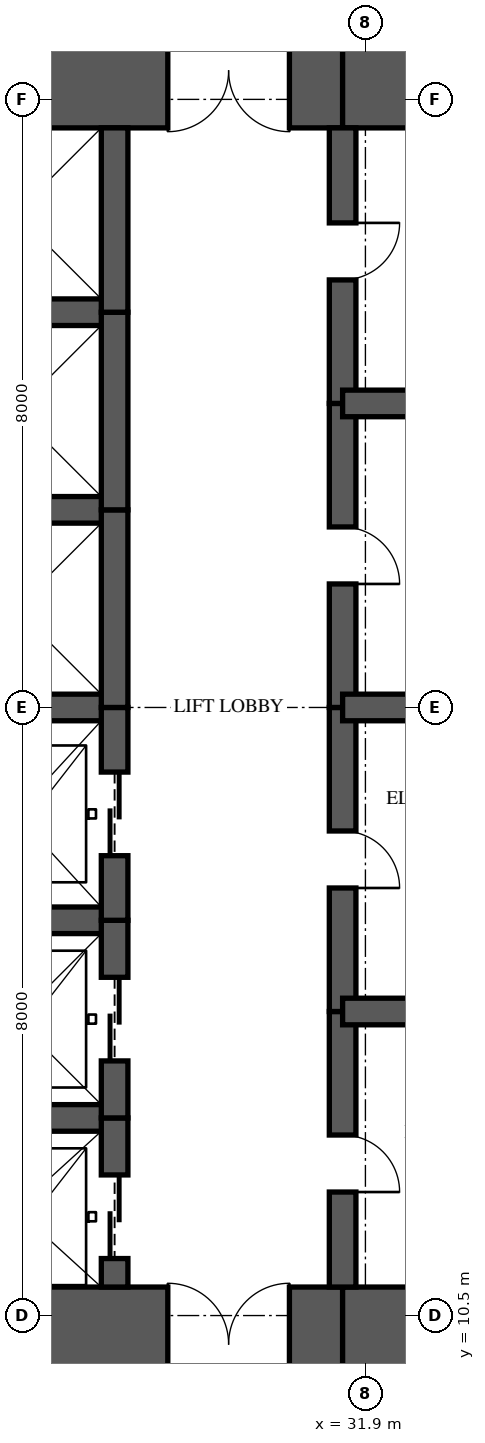
"""IFC4 building model, lengths in metres.
Left out: names, types, materials, properties, quantities, classifications, styles, units other than length and angle.
Written with IfcOpenShell. Run it as: python <this file> out.ifc"""

import sys

from ifc_helpers import new_model, si_unit, direction, frame, frame_2d, origin, place, context, subcontext, project, spatial, rectangle, extrude, element, fill, save


model = new_model("IFC4")
c1 = context("Model", 3, precision=1e-05, world=origin(), true_north=direction((0.0, 1.0)))
c2 = subcontext(c1, "Body", "Model", "MODEL_VIEW")
j1 = project(units=[si_unit("LENGTHUNIT", "METRE"), si_unit("PLANEANGLEUNIT", "RADIAN")], contexts=[c1])
p1 = place(None, origin())
s1 = spatial("IfcSite", under=j1, at=p1, CompositionType="ELEMENT")
p2 = place(p1, origin())
s2 = spatial("IfcBuilding", under=s1, at=p2, CompositionType="ELEMENT")
p3 = place(p2, frame((0.0, 0.0, 91.45)))
s3 = spatial("IfcBuildingStorey", under=s2, at=p3, CompositionType="ELEMENT", Elevation=91.45)
p4 = place(p3, frame((26.0, 10.125, 0.0), z_axis=(0.0, 0.0, 1.0), x_axis=(1.0, 0.0, 0.0)))
e1 = element("IfcWall", 1, at=p4, inside=s3, PredefinedType="SHEAR", context=c2, shape_type="SweptSolid", body=[
    extrude(rectangle(XDim=5.6, YDim=1.5, at=frame_2d((2.8, 0.0))), origin(), (0.0, 0.0, 1.0), 3.35),
])
p5 = place(p4, frame((3.3, 0.0, 0.0)))
e2 = element("IfcOpeningElement", 2, at=p5, cuts=e1, PredefinedType="OPENING", context=c2, shape_type="SweptSolid", body=[
    extrude(rectangle(XDim=1.6, YDim=2.1, at=frame_2d((0.8, 1.05))), frame((0.0, 0.76, 0.0), z_axis=(0.0, -1.0, 0.0), x_axis=(1.0, 0.0, 0.0)), (0.0, 0.0, 1.0), 1.52),
])
for number, where, z_axis, x_axis in (
    (3, (31.6, 10.125, 0.0), (0.0, 0.0, 1.0), (1.0, 0.0, 0.0)),
    (4, (35.9, 26.875, 0.0), (0.0, 0.0, 1.0), (-1.0, 0.0, 0.0)),
):
    element("IfcWall", number, at=place(p3, frame(where, z_axis=z_axis, x_axis=x_axis)), inside=s3, PredefinedType="SHEAR", context=c2, shape_type="SweptSolid", body=[
        extrude(rectangle(XDim=4.3, YDim=1.5, at=frame_2d((2.15, 0.0))), origin(), (0.0, 0.0, 1.0), 3.35),
    ])
p6 = place(p3, frame((31.6, 26.875, 0.0), z_axis=(0.0, 0.0, 1.0), x_axis=(-1.0, 0.0, 0.0)))
e5 = element("IfcWall", 5, at=p6, inside=s3, PredefinedType="SHEAR", context=c2, shape_type="SweptSolid", body=[
    extrude(rectangle(XDim=5.6, YDim=1.5, at=frame_2d((2.8, 0.0))), origin(), (0.0, 0.0, 1.0), 3.35),
])
p7 = place(p6, frame((0.7, 0.0, 0.0)))
e6 = element("IfcOpeningElement", 6, at=p7, cuts=e5, PredefinedType="OPENING", context=c2, shape_type="SweptSolid", body=[
    extrude(rectangle(XDim=1.6, YDim=2.1, at=frame_2d((0.8, 1.05))), frame((0.0, 0.76, 0.0), z_axis=(0.0, -1.0, 0.0), x_axis=(1.0, 0.0, 0.0)), (0.0, 0.0, 1.0), 1.52),
])
p8 = place(p3, frame((28.6, 10.875, 0.0), z_axis=(0.0, 0.0, 1.0), x_axis=(0.0, 1.0, 0.0)))
e7 = element("IfcWall", 7, at=p8, inside=s3, PredefinedType="SHEAR", context=c2, shape_type="SweptSolid", body=[
    extrude(rectangle(XDim=2.225, YDim=0.35, at=frame_2d((1.113, 0.0))), origin(), (0.0, 0.0, 1.0), 3.35),
])
p9 = place(p8, frame((0.375, 0.0, 0.0)))
e8 = element("IfcOpeningElement", 8, at=p9, cuts=e7, PredefinedType="OPENING", context=c2, shape_type="SweptSolid", body=[
    extrude(rectangle(XDim=1.1, YDim=2.1, at=frame_2d((0.55, 1.05))), frame((0.0, 0.185, 0.0), z_axis=(0.0, -1.0, 0.0), x_axis=(1.0, 0.0, 0.0)), (0.0, 0.0, 1.0), 0.37),
])
p10 = place(p3, frame((28.6, 13.1, 0.0), z_axis=(0.0, 0.0, 1.0), x_axis=(0.0, 1.0, 0.0)))
e9 = element("IfcWall", 9, at=p10, inside=s3, PredefinedType="SHEAR", context=c2, shape_type="SweptSolid", body=[
    extrude(rectangle(XDim=2.6, YDim=0.35, at=frame_2d((1.3, 0.0))), origin(), (0.0, 0.0, 1.0), 3.35),
])
p11 = place(p10, frame((0.75, 0.0, 0.0)))
e10 = element("IfcOpeningElement", 10, at=p11, cuts=e9, PredefinedType="OPENING", context=c2, shape_type="SweptSolid", body=[
    extrude(rectangle(XDim=1.1, YDim=2.1, at=frame_2d((0.55, 1.05))), frame((0.0, 0.185, 0.0), z_axis=(0.0, -1.0, 0.0), x_axis=(1.0, 0.0, 0.0)), (0.0, 0.0, 1.0), 0.37),
])
p12 = place(p3, frame((28.6, 15.7, 0.0), z_axis=(0.0, 0.0, 1.0), x_axis=(0.0, 1.0, 0.0)))
e11 = element("IfcWall", 11, at=p12, inside=s3, PredefinedType="SHEAR", context=c2, shape_type="SweptSolid", body=[
    extrude(rectangle(XDim=2.8, YDim=0.35, at=frame_2d((1.4, 0.0))), origin(), (0.0, 0.0, 1.0), 3.35),
])
p13 = place(p12, frame((0.85, 0.0, 0.0)))
e12 = element("IfcOpeningElement", 12, at=p13, cuts=e11, PredefinedType="OPENING", context=c2, shape_type="SweptSolid", body=[
    extrude(rectangle(XDim=1.1, YDim=2.1, at=frame_2d((0.55, 1.05))), frame((0.0, 0.185, 0.0), z_axis=(0.0, -1.0, 0.0), x_axis=(1.0, 0.0, 0.0)), (0.0, 0.0, 1.0), 0.37),
])
p14 = place(p3, frame((28.6, 18.5, 0.0), z_axis=(0.0, 0.0, 1.0), x_axis=(0.0, 1.0, 0.0)))
e13 = element("IfcWall", 13, at=p14, inside=s3, PredefinedType="SHEAR", context=c2, shape_type="SweptSolid", body=[
    extrude(rectangle(XDim=2.6, YDim=0.35, at=frame_2d((1.3, 0.0))), origin(), (0.0, 0.0, 1.0), 3.35),
])
p15 = place(p3, frame((28.6, 21.1, 0.0), z_axis=(0.0, 0.0, 1.0), x_axis=(0.0, 1.0, 0.0)))
e14 = element("IfcWall", 14, at=p15, inside=s3, PredefinedType="SHEAR", context=c2, shape_type="SweptSolid", body=[
    extrude(rectangle(XDim=2.6, YDim=0.35, at=frame_2d((1.3, 0.0))), origin(), (0.0, 0.0, 1.0), 3.35),
])
p16 = place(p3, frame((28.6, 23.7, 0.0), z_axis=(0.0, 0.0, 1.0), x_axis=(0.0, 1.0, 0.0)))
e15 = element("IfcWall", 15, at=p16, inside=s3, PredefinedType="SHEAR", context=c2, shape_type="SweptSolid", body=[
    extrude(rectangle(XDim=2.425, YDim=0.35, at=frame_2d((1.212, 0.0))), origin(), (0.0, 0.0, 1.0), 3.35),
])
p17 = place(p3, frame((31.6, 10.875, 0.0), z_axis=(0.0, 0.0, 1.0), x_axis=(0.0, 1.0, 0.0)))
e16 = element("IfcWall", 16, at=p17, inside=s3, PredefinedType="SHEAR", context=c2, shape_type="SweptSolid", body=[
    extrude(rectangle(XDim=3.625, YDim=0.35, at=frame_2d((1.812, 0.0))), origin(), (0.0, 0.0, 1.0), 3.35),
])
p18 = place(p17, frame((1.25, 0.0, 0.0)))
e17 = element("IfcOpeningElement", 17, at=p18, cuts=e16, PredefinedType="OPENING", context=c2, shape_type="SweptSolid", body=[
    extrude(rectangle(XDim=0.75, YDim=2.1, at=frame_2d((0.375, 1.05))), frame((0.0, 0.185, 0.0), z_axis=(0.0, -1.0, 0.0), x_axis=(1.0, 0.0, 0.0)), (0.0, 0.0, 1.0), 0.37),
])
p19 = place(p3, frame((31.6, 14.5, 0.0), z_axis=(0.0, 0.0, 1.0), x_axis=(0.0, 1.0, 0.0)))
e18 = element("IfcWall", 18, at=p19, inside=s3, PredefinedType="SHEAR", context=c2, shape_type="SweptSolid", body=[
    extrude(rectangle(XDim=4.0, YDim=0.35, at=frame_2d((2.0, 0.0))), origin(), (0.0, 0.0, 1.0), 3.35),
])
p20 = place(p19, frame((1.625, 0.0, 0.0)))
e19 = element("IfcOpeningElement", 19, at=p20, cuts=e18, PredefinedType="OPENING", context=c2, shape_type="SweptSolid", body=[
    extrude(rectangle(XDim=0.75, YDim=2.1, at=frame_2d((0.375, 1.05))), frame((0.0, 0.185, 0.0), z_axis=(0.0, -1.0, 0.0), x_axis=(1.0, 0.0, 0.0)), (0.0, 0.0, 1.0), 0.37),
])
p21 = place(p3, frame((31.6, 18.5, 0.0), z_axis=(0.0, 0.0, 1.0), x_axis=(0.0, 1.0, 0.0)))
e20 = element("IfcWall", 20, at=p21, inside=s3, PredefinedType="SHEAR", context=c2, shape_type="SweptSolid", body=[
    extrude(rectangle(XDim=4.0, YDim=0.35, at=frame_2d((2.0, 0.0))), origin(), (0.0, 0.0, 1.0), 3.35),
])
p22 = place(p21, frame((1.625, 0.0, 0.0)))
e21 = element("IfcOpeningElement", 21, at=p22, cuts=e20, PredefinedType="OPENING", context=c2, shape_type="SweptSolid", body=[
    extrude(rectangle(XDim=0.75, YDim=2.1, at=frame_2d((0.375, 1.05))), frame((0.0, 0.185, 0.0), z_axis=(0.0, -1.0, 0.0), x_axis=(1.0, 0.0, 0.0)), (0.0, 0.0, 1.0), 0.37),
])
p23 = place(p3, frame((31.6, 22.5, 0.0), z_axis=(0.0, 0.0, 1.0), x_axis=(0.0, 1.0, 0.0)))
e22 = element("IfcWall", 22, at=p23, inside=s3, PredefinedType="SHEAR", context=c2, shape_type="SweptSolid", body=[
    extrude(rectangle(XDim=3.625, YDim=0.35, at=frame_2d((1.812, 0.0))), origin(), (0.0, 0.0, 1.0), 3.35),
])
p24 = place(p23, frame((1.625, 0.0, 0.0)))
e23 = element("IfcOpeningElement", 23, at=p24, cuts=e22, PredefinedType="OPENING", context=c2, shape_type="SweptSolid", body=[
    extrude(rectangle(XDim=0.75, YDim=2.1, at=frame_2d((0.375, 1.05))), frame((0.0, 0.185, 0.0), z_axis=(0.0, -1.0, 0.0), x_axis=(1.0, 0.0, 0.0)), (0.0, 0.0, 1.0), 0.37),
])
for number, where, z_axis, x_axis in (
    (24, (26.0, 13.1, 0.0), (0.0, 0.0, 1.0), (1.0, 0.0, 0.0)),
    (25, (26.0, 15.7, 0.0), (0.0, 0.0, 1.0), (1.0, 0.0, 0.0)),
    (26, (26.0, 18.5, 0.0), (0.0, 0.0, 1.0), (1.0, 0.0, 0.0)),
    (27, (26.0, 21.1, 0.0), (0.0, 0.0, 1.0), (1.0, 0.0, 0.0)),
    (28, (26.0, 23.7, 0.0), (0.0, 0.0, 1.0), (1.0, 0.0, 0.0)),
):
    element("IfcWall", number, at=place(p3, frame(where, z_axis=z_axis, x_axis=x_axis)), inside=s3, PredefinedType="SHEAR", context=c2, shape_type="SweptSolid", body=[
        extrude(rectangle(XDim=2.6, YDim=0.35, at=frame_2d((1.3, 0.0))), origin(), (0.0, 0.0, 1.0), 3.35),
    ])
for number, where, z_axis, x_axis in (
    (29, (31.6, 14.5, 0.0), (0.0, 0.0, 1.0), (1.0, 0.0, 0.0)),
    (30, (31.6, 18.5, 0.0), (0.0, 0.0, 1.0), (1.0, 0.0, 0.0)),
    (31, (31.6, 22.5, 0.0), (0.0, 0.0, 1.0), (1.0, 0.0, 0.0)),
):
    element("IfcWall", number, at=place(p3, frame(where, z_axis=z_axis, x_axis=x_axis)), inside=s3, PredefinedType="SHEAR", context=c2, shape_type="SweptSolid", body=[
        extrude(rectangle(XDim=4.3, YDim=0.35, at=frame_2d((2.15, 0.0))), origin(), (0.0, 0.0, 1.0), 3.35),
    ])
p25 = place(p9, origin())
e32 = element("IfcDoor", 32, at=p25, inside=s3, OperationType="SLIDING_TO_LEFT", PredefinedType="DOOR", context=c2, shape_type="SweptSolid", body=[
    extrude(rectangle(XDim=1.1, YDim=2.1, at=frame_2d((0.55, 1.05))), frame((0.0, 0.025, 0.0), z_axis=(0.0, -1.0, 0.0), x_axis=(1.0, 0.0, 0.0)), (0.0, 0.0, 1.0), 0.05),
])
fill(e8, e32)
p26 = place(p11, origin())
e33 = element("IfcDoor", 33, at=p26, inside=s3, OperationType="SLIDING_TO_LEFT", PredefinedType="DOOR", context=c2, shape_type="SweptSolid", body=[
    extrude(rectangle(XDim=1.1, YDim=2.1, at=frame_2d((0.55, 1.05))), frame((0.0, 0.025, 0.0), z_axis=(0.0, -1.0, 0.0), x_axis=(1.0, 0.0, 0.0)), (0.0, 0.0, 1.0), 0.05),
])
fill(e10, e33)
p27 = place(p13, origin())
e34 = element("IfcDoor", 34, at=p27, inside=s3, OperationType="SLIDING_TO_LEFT", PredefinedType="DOOR", context=c2, shape_type="SweptSolid", body=[
    extrude(rectangle(XDim=1.1, YDim=2.1, at=frame_2d((0.55, 1.05))), frame((0.0, 0.025, 0.0), z_axis=(0.0, -1.0, 0.0), x_axis=(1.0, 0.0, 0.0)), (0.0, 0.0, 1.0), 0.05),
])
fill(e12, e34)
p28 = place(p5, origin())
e35 = element("IfcDoor", 35, at=p28, inside=s3, OperationType="DOUBLE_DOOR_SINGLE_SWING", PredefinedType="DOOR", context=c2, shape_type="SweptSolid", body=[
    extrude(rectangle(XDim=1.6, YDim=2.1, at=frame_2d((0.8, 1.05))), frame((0.0, 0.025, 0.0), z_axis=(0.0, -1.0, 0.0), x_axis=(1.0, 0.0, 0.0)), (0.0, 0.0, 1.0), 0.05),
])
fill(e2, e35)
p29 = place(p7, origin())
e36 = element("IfcDoor", 36, at=p29, inside=s3, OperationType="DOUBLE_DOOR_SINGLE_SWING", PredefinedType="DOOR", context=c2, shape_type="SweptSolid", body=[
    extrude(rectangle(XDim=1.6, YDim=2.1, at=frame_2d((0.8, 1.05))), frame((0.0, 0.025, 0.0), z_axis=(0.0, -1.0, 0.0), x_axis=(1.0, 0.0, 0.0)), (0.0, 0.0, 1.0), 0.05),
])
fill(e6, e36)
p30 = place(p18, frame((0.75, 0.0, 0.0), z_axis=(0.0, 0.0, 1.0), x_axis=(-1.0, 0.0, 0.0)))
e37 = element("IfcDoor", 37, at=p30, inside=s3, OperationType="SINGLE_SWING_RIGHT", PredefinedType="DOOR", context=c2, shape_type="SweptSolid", body=[
    extrude(rectangle(XDim=0.75, YDim=2.1, at=frame_2d((0.375, 1.05))), frame((0.0, 0.025, 0.0), z_axis=(0.0, -1.0, 0.0), x_axis=(1.0, 0.0, 0.0)), (0.0, 0.0, 1.0), 0.05),
])
fill(e17, e37)
p31 = place(p20, frame((0.75, 0.0, 0.0), z_axis=(0.0, 0.0, 1.0), x_axis=(-1.0, 0.0, 0.0)))
e38 = element("IfcDoor", 38, at=p31, inside=s3, OperationType="SINGLE_SWING_RIGHT", PredefinedType="DOOR", context=c2, shape_type="SweptSolid", body=[
    extrude(rectangle(XDim=0.75, YDim=2.1, at=frame_2d((0.375, 1.05))), frame((0.0, 0.025, 0.0), z_axis=(0.0, -1.0, 0.0), x_axis=(1.0, 0.0, 0.0)), (0.0, 0.0, 1.0), 0.05),
])
fill(e19, e38)
p32 = place(p22, frame((0.75, 0.0, 0.0), z_axis=(0.0, 0.0, 1.0), x_axis=(-1.0, 0.0, 0.0)))
e39 = element("IfcDoor", 39, at=p32, inside=s3, OperationType="SINGLE_SWING_RIGHT", PredefinedType="DOOR", context=c2, shape_type="SweptSolid", body=[
    extrude(rectangle(XDim=0.75, YDim=2.1, at=frame_2d((0.375, 1.05))), frame((0.0, 0.025, 0.0), z_axis=(0.0, -1.0, 0.0), x_axis=(1.0, 0.0, 0.0)), (0.0, 0.0, 1.0), 0.05),
])
fill(e21, e39)
p33 = place(p24, frame((0.75, 0.0, 0.0), z_axis=(0.0, 0.0, 1.0), x_axis=(-1.0, 0.0, 0.0)))
e40 = element("IfcDoor", 40, at=p33, inside=s3, OperationType="SINGLE_SWING_LEFT", PredefinedType="DOOR", context=c2, shape_type="SweptSolid", body=[
    extrude(rectangle(XDim=0.75, YDim=2.1, at=frame_2d((0.375, 1.05))), frame((0.0, 0.025, 0.0), z_axis=(0.0, -1.0, 0.0), x_axis=(1.0, 0.0, 0.0)), (0.0, 0.0, 1.0), 0.05),
])
fill(e23, e40)
save(model, sys.argv[1])
